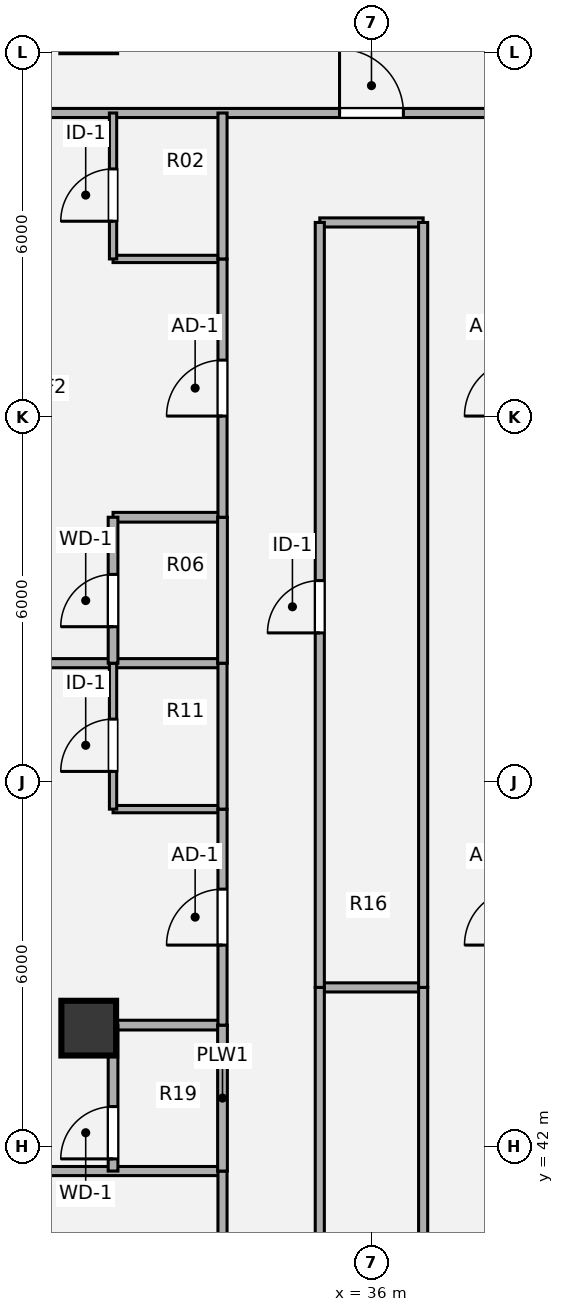
"""IFC4 building model, lengths in metres.
Left out: names, types, materials, properties, quantities, classifications, styles, units other than length and angle.
Written with IfcOpenShell. Run it as: python <this file> out.ifc"""

import sys

from ifc_helpers import new_model, si_unit, direction, frame, frame_2d, origin, origin_2d, place, context, subcontext, project, spatial, rectangle, hollow_circle, extrude, source, transform, mapped, element, fill, save


model = new_model("IFC4")
c1 = context("Model", 3, precision=1e-05, world=origin(), true_north=direction((0.0, 1.0)))
c2 = subcontext(c1, "Body", "Model", "MODEL_VIEW")
j1 = project(units=[si_unit("LENGTHUNIT", "METRE"), si_unit("PLANEANGLEUNIT", "RADIAN")], contexts=[c1])
p1 = place(None, origin())
s1 = spatial("IfcSite", under=j1, at=p1, CompositionType="ELEMENT")
p2 = place(p1, origin())
s2 = spatial("IfcBuilding", under=s1, at=p2, CompositionType="ELEMENT")
p3 = place(p2, frame((0.0, 0.0, 226.8)))
s3 = spatial("IfcBuildingStorey", under=s2, at=p3, CompositionType="ELEMENT", Elevation=226.8)
m1 = source(origin(), c2, "Body", "SweptSolid", [
    extrude(hollow_circle(Radius=0.45, WallThickness=0.032, at=origin_2d()), origin(), (0.0, 0.0, 1.0), 3.78),
])
p4 = place(p3, frame((31.35, 43.95, 0.0), z_axis=(0.0, 0.0, 1.0), x_axis=(1.0, 0.0, 0.0)))
e1 = element("IfcColumn", 1, at=p4, inside=s3, PredefinedType="COLUMN", context=c2, shape_type="MappedRepresentation", body=[
    mapped(m1, transform((0.0, 0.0, 0.0), x_axis=(1.0, 0.0, 0.0), y_axis=(0.0, 1.0, 0.0), z_axis=(0.0, 0.0, 1.0), scale=1.0)),
])
p5 = place(p3, frame((27.558, 41.6, 0.0), z_axis=(0.0, 0.0, 1.0), x_axis=(1.0, 0.0, 0.0)))
e2 = element("IfcWall", 2, at=p5, inside=s3, PredefinedType="PARTITIONING", context=c2, shape_type="SweptSolid", body=[
    extrude(rectangle(XDim=5.992, YDim=0.15, at=frame_2d((2.996, 0.0))), origin(), (0.0, 0.0, 1.0), 3.5),
])
p6 = place(p3, frame((31.75, 44.0, 0.0), z_axis=(0.0, 0.0, 1.0), x_axis=(1.0, 0.0, 0.0)))
e3 = element("IfcWall", 3, at=p6, inside=s3, PredefinedType="PLUMBINGWALL", context=c2, shape_type="SweptSolid", body=[
    extrude(rectangle(XDim=1.8, YDim=0.16, at=frame_2d((0.9, 0.0))), origin(), (0.0, 0.0, 1.0), 2.903),
])
p7 = place(p3, frame((35.15, 44.62, 0.0), z_axis=(0.0, 0.0, 1.0), x_axis=(1.0, 0.0, 0.0)))
e4 = element("IfcWall", 4, at=p7, inside=s3, PredefinedType="PARTITIONING", context=c2, shape_type="SweptSolid", body=[
    extrude(rectangle(XDim=1.7, YDim=0.15, at=frame_2d((0.85, 0.0))), origin(), (0.0, 0.0, 1.0), 3.259),
])
p8 = place(p3, frame((31.75, 47.552, 0.0), z_axis=(0.0, 0.0, 1.0), x_axis=(1.0, 0.0, 0.0)))
e5 = element("IfcWall", 5, at=p8, inside=s3, PredefinedType="PARTITIONING", context=c2, shape_type="SweptSolid", body=[
    extrude(rectangle(XDim=1.8, YDim=0.12, at=frame_2d((0.9, 0.0))), origin(), (0.0, 0.0, 1.0), 3.259),
])
p9 = place(p3, frame((17.78, 49.952, 0.0), z_axis=(0.0, 0.0, 1.0), x_axis=(1.0, 0.0, 0.0)))
e6 = element("IfcWall", 6, at=p9, inside=s3, PredefinedType="PARTITIONING", context=c2, shape_type="SweptSolid", body=[
    extrude(rectangle(XDim=15.77, YDim=0.15, at=frame_2d((7.885, 0.0))), origin(), (0.0, 0.0, 1.0), 2.982),
])
p10 = place(p3, frame((31.75, 52.352, 0.0), z_axis=(0.0, 0.0, 1.0), x_axis=(1.0, 0.0, 0.0)))
e7 = element("IfcWall", 7, at=p10, inside=s3, PredefinedType="PLUMBINGWALL", context=c2, shape_type="SweptSolid", body=[
    extrude(rectangle(XDim=1.8, YDim=0.16, at=frame_2d((0.9, 0.0))), origin(), (0.0, 0.0, 1.0), 3.259),
])
p11 = place(p3, frame((31.75, 56.6, 0.0), z_axis=(0.0, 0.0, 1.0), x_axis=(1.0, 0.0, 0.0)))
e8 = element("IfcWall", 8, at=p11, inside=s3, PredefinedType="PARTITIONING", context=c2, shape_type="SweptSolid", body=[
    extrude(rectangle(XDim=1.8, YDim=0.12, at=frame_2d((0.9, 0.0))), origin(), (0.0, 0.0, 1.0), 3.259),
])
p12 = place(p3, frame((35.15, 57.2, 0.0), z_axis=(0.0, 0.0, 1.0), x_axis=(1.0, 0.0, 0.0)))
e9 = element("IfcWall", 9, at=p12, inside=s3, PredefinedType="PARTITIONING", context=c2, shape_type="SweptSolid", body=[
    extrude(rectangle(XDim=1.7, YDim=0.15, at=frame_2d((0.85, 0.0))), origin(), (0.0, 0.0, 1.0), 3.308),
])
p13 = place(p3, frame((27.1, 59.0, 0.0), z_axis=(0.0, 0.0, 1.0), x_axis=(1.0, 0.0, 0.0)))
e10 = element("IfcWall", 10, at=p13, inside=s3, PredefinedType="PARTITIONING", context=c2, shape_type="SweptSolid", body=[
    extrude(rectangle(XDim=17.8, YDim=0.15, at=frame_2d((8.9, 0.0))), origin(), (0.0, 0.0, 1.0), 3.308),
])
p14 = place(p13, frame((8.375, 0.0, 0.0)))
e11 = element("IfcOpeningElement", 11, at=p14, cuts=e10, PredefinedType="OPENING", context=c2, shape_type="SweptSolid", body=[
    extrude(rectangle(XDim=1.05, YDim=2.1, at=origin_2d()), frame((0.525, 0.085, 1.05), z_axis=(0.0, -1.0, 0.0), x_axis=(1.0, 0.0, 0.0)), (0.0, 0.0, 1.0), 0.17),
])
p15 = place(p3, frame((31.75, 41.6, 0.0), z_axis=(0.0, 0.0, 1.0), x_axis=(0.0, 1.0, 0.0)))
e12 = element("IfcWall", 12, at=p15, inside=s3, PredefinedType="PLUMBINGWALL", context=c2, shape_type="SweptSolid", body=[
    extrude(rectangle(XDim=2.4, YDim=0.16, at=frame_2d((1.2, 0.0))), origin(), (0.0, 0.0, 1.0), 3.5),
])
p16 = place(p15, frame((0.2, 0.0, 0.0)))
e13 = element("IfcOpeningElement", 13, at=p16, cuts=e12, PredefinedType="OPENING", context=c2, shape_type="SweptSolid", body=[
    extrude(rectangle(XDim=0.86, YDim=2.1, at=origin_2d()), frame((0.43, 0.09, 1.05), z_axis=(0.0, -1.0, 0.0), x_axis=(1.0, 0.0, 0.0)), (0.0, 0.0, 1.0), 0.18),
])
p17 = place(p3, frame((31.75, 47.552, 0.0), z_axis=(0.0, 0.0, 1.0), x_axis=(0.0, 1.0, 0.0)))
e14 = element("IfcWall", 14, at=p17, inside=s3, PredefinedType="PARTITIONING", context=c2, shape_type="SweptSolid", body=[
    extrude(rectangle(XDim=2.4, YDim=0.12, at=frame_2d((1.2, 0.0))), origin(), (0.0, 0.0, 1.0), 3.5),
])
p18 = place(p17, frame((0.62, 0.0, 0.0)))
e15 = element("IfcOpeningElement", 15, at=p18, cuts=e14, PredefinedType="OPENING", context=c2, shape_type="SweptSolid", body=[
    extrude(rectangle(XDim=0.86, YDim=2.1, at=origin_2d()), frame((0.43, 0.07, 1.05), z_axis=(0.0, -1.0, 0.0), x_axis=(1.0, 0.0, 0.0)), (0.0, 0.0, 1.0), 0.14),
])
p19 = place(p3, frame((31.75, 49.952, 0.0), z_axis=(0.0, 0.0, 1.0), x_axis=(0.0, 1.0, 0.0)))
e16 = element("IfcWall", 16, at=p19, inside=s3, PredefinedType="PLUMBINGWALL", context=c2, shape_type="SweptSolid", body=[
    extrude(rectangle(XDim=2.4, YDim=0.16, at=frame_2d((1.2, 0.0))), origin(), (0.0, 0.0, 1.0), 3.5),
])
p20 = place(p19, frame((0.6, 0.0, 0.0)))
e17 = element("IfcOpeningElement", 17, at=p20, cuts=e16, PredefinedType="OPENING", context=c2, shape_type="SweptSolid", body=[
    extrude(rectangle(XDim=0.86, YDim=2.1, at=origin_2d()), frame((0.43, 0.09, 1.05), z_axis=(0.0, -1.0, 0.0), x_axis=(1.0, 0.0, 0.0)), (0.0, 0.0, 1.0), 0.18),
])
p21 = place(p3, frame((31.75, 56.6, 0.0), z_axis=(0.0, 0.0, 1.0), x_axis=(0.0, 1.0, 0.0)))
e18 = element("IfcWall", 18, at=p21, inside=s3, PredefinedType="PARTITIONING", context=c2, shape_type="SweptSolid", body=[
    extrude(rectangle(XDim=2.4, YDim=0.12, at=frame_2d((1.2, 0.0))), origin(), (0.0, 0.0, 1.0), 3.5),
])
p22 = place(p21, frame((0.62, 0.0, 0.0)))
e19 = element("IfcOpeningElement", 19, at=p22, cuts=e18, PredefinedType="OPENING", context=c2, shape_type="SweptSolid", body=[
    extrude(rectangle(XDim=0.86, YDim=2.1, at=origin_2d()), frame((0.43, 0.07, 1.05), z_axis=(0.0, -1.0, 0.0), x_axis=(1.0, 0.0, 0.0)), (0.0, 0.0, 1.0), 0.14),
])
p23 = place(p3, frame((33.55, 21.2, 0.0), z_axis=(0.0, 0.0, 1.0), x_axis=(0.0, 1.0, 0.0)))
e20 = element("IfcWall", 20, at=p23, inside=s3, PredefinedType="PARTITIONING", context=c2, shape_type="SweptSolid", body=[
    extrude(rectangle(XDim=20.4, YDim=0.15, at=frame_2d((10.2, 0.0))), origin(), (0.0, 0.0, 1.0), 3.5),
])
p24 = place(p23, frame((9.64, 0.0, 0.0)))
e21 = element("IfcOpeningElement", 21, at=p24, cuts=e20, PredefinedType="OPENING", context=c2, shape_type="SweptSolid", body=[
    extrude(rectangle(XDim=0.86, YDim=2.1, at=origin_2d()), frame((0.43, 0.085, 1.05), z_axis=(0.0, -1.0, 0.0), x_axis=(1.0, 0.0, 0.0)), (0.0, 0.0, 1.0), 0.17),
])
p25 = place(p3, frame((33.55, 41.6, 0.0), z_axis=(0.0, 0.0, 1.0), x_axis=(0.0, 1.0, 0.0)))
e22 = element("IfcWall", 22, at=p25, inside=s3, PredefinedType="PLUMBINGWALL", context=c2, shape_type="SweptSolid", body=[
    extrude(rectangle(XDim=2.4, YDim=0.16, at=frame_2d((1.2, 0.0))), origin(), (0.0, 0.0, 1.0), 3.5),
])
p26 = place(p3, frame((33.55, 44.0, 0.0), z_axis=(0.0, 0.0, 1.0), x_axis=(0.0, 1.0, 0.0)))
e23 = element("IfcWall", 23, at=p26, inside=s3, PredefinedType="PARTITIONING", context=c2, shape_type="SweptSolid", body=[
    extrude(rectangle(XDim=3.552, YDim=0.15, at=frame_2d((1.776, 0.0))), origin(), (0.0, 0.0, 1.0), 3.5),
])
p27 = place(p26, frame((1.316, 0.0, 0.0)))
e24 = element("IfcOpeningElement", 24, at=p27, cuts=e23, PredefinedType="OPENING", context=c2, shape_type="SweptSolid", body=[
    extrude(rectangle(XDim=0.92, YDim=2.1, at=origin_2d()), frame((0.46, 0.085, 1.05), z_axis=(0.0, -1.0, 0.0), x_axis=(1.0, 0.0, 0.0)), (0.0, 0.0, 1.0), 0.17),
])
p28 = place(p3, frame((33.55, 47.552, 0.0), z_axis=(0.0, 0.0, 1.0), x_axis=(0.0, 1.0, 0.0)))
e25 = element("IfcWall", 25, at=p28, inside=s3, PredefinedType="PARTITIONING", context=c2, shape_type="SweptSolid", body=[
    extrude(rectangle(XDim=2.4, YDim=0.15, at=frame_2d((1.2, 0.0))), origin(), (0.0, 0.0, 1.0), 3.5),
])
p29 = place(p3, frame((33.55, 49.952, 0.0), z_axis=(0.0, 0.0, 1.0), x_axis=(0.0, 1.0, 0.0)))
e26 = element("IfcWall", 26, at=p29, inside=s3, PredefinedType="PLUMBINGWALL", context=c2, shape_type="SweptSolid", body=[
    extrude(rectangle(XDim=2.4, YDim=0.16, at=frame_2d((1.2, 0.0))), origin(), (0.0, 0.0, 1.0), 3.5),
])
p30 = place(p3, frame((33.55, 52.352, 0.0), z_axis=(0.0, 0.0, 1.0), x_axis=(0.0, 1.0, 0.0)))
e27 = element("IfcWall", 27, at=p30, inside=s3, PredefinedType="PARTITIONING", context=c2, shape_type="SweptSolid", body=[
    extrude(rectangle(XDim=4.248, YDim=0.15, at=frame_2d((2.124, 0.0))), origin(), (0.0, 0.0, 1.0), 3.5),
])
p31 = place(p30, frame((1.664, 0.0, 0.0)))
e28 = element("IfcOpeningElement", 28, at=p31, cuts=e27, PredefinedType="OPENING", context=c2, shape_type="SweptSolid", body=[
    extrude(rectangle(XDim=0.92, YDim=2.1, at=origin_2d()), frame((0.46, 0.085, 1.05), z_axis=(0.0, -1.0, 0.0), x_axis=(1.0, 0.0, 0.0)), (0.0, 0.0, 1.0), 0.17),
])
p32 = place(p3, frame((33.55, 56.6, 0.0), z_axis=(0.0, 0.0, 1.0), x_axis=(0.0, 1.0, 0.0)))
e29 = element("IfcWall", 29, at=p32, inside=s3, PredefinedType="PARTITIONING", context=c2, shape_type="SweptSolid", body=[
    extrude(rectangle(XDim=2.4, YDim=0.15, at=frame_2d((1.2, 0.0))), origin(), (0.0, 0.0, 1.0), 3.5),
])
p33 = place(p3, frame((35.15, 25.2, 0.0), z_axis=(0.0, 0.0, 1.0), x_axis=(0.0, 1.0, 0.0)))
e30 = element("IfcWall", 30, at=p33, inside=s3, PredefinedType="PARTITIONING", context=c2, shape_type="SweptSolid", body=[
    extrude(rectangle(XDim=19.42, YDim=0.15, at=frame_2d((9.71, 0.0))), origin(), (0.0, 0.0, 1.0), 3.5),
])
p34 = place(p3, frame((35.15, 44.62, 0.0), z_axis=(0.0, 0.0, 1.0), x_axis=(0.0, 1.0, 0.0)))
e31 = element("IfcWall", 31, at=p34, inside=s3, PredefinedType="PARTITIONING", context=c2, shape_type="SweptSolid", body=[
    extrude(rectangle(XDim=12.58, YDim=0.15, at=frame_2d((6.29, 0.0))), origin(), (0.0, 0.0, 1.0), 3.5),
])
p35 = place(p34, frame((5.83, 0.0, 0.0)))
e32 = element("IfcOpeningElement", 32, at=p35, cuts=e31, PredefinedType="OPENING", context=c2, shape_type="SweptSolid", body=[
    extrude(rectangle(XDim=0.86, YDim=2.1, at=origin_2d()), frame((0.43, 0.085, 1.05), z_axis=(0.0, -1.0, 0.0), x_axis=(1.0, 0.0, 0.0)), (0.0, 0.0, 1.0), 0.17),
])
p36 = place(p3, frame((36.85, 25.2, 0.0), z_axis=(0.0, 0.0, 1.0), x_axis=(0.0, 1.0, 0.0)))
e33 = element("IfcWall", 33, at=p36, inside=s3, PredefinedType="PARTITIONING", context=c2, shape_type="SweptSolid", body=[
    extrude(rectangle(XDim=19.42, YDim=0.15, at=frame_2d((9.71, 0.0))), origin(), (0.0, 0.0, 1.0), 3.5),
])
p37 = place(p36, frame((9.185, 0.0, 0.0)))
e34 = element("IfcOpeningElement", 34, at=p37, cuts=e33, PredefinedType="OPENING", context=c2, shape_type="SweptSolid", body=[
    extrude(rectangle(XDim=1.05, YDim=2.1, at=origin_2d()), frame((0.525, 0.085, 1.05), z_axis=(0.0, -1.0, 0.0), x_axis=(1.0, 0.0, 0.0)), (0.0, 0.0, 1.0), 0.17),
])
p38 = place(p3, frame((36.85, 44.62, 0.0), z_axis=(0.0, 0.0, 1.0), x_axis=(0.0, 1.0, 0.0)))
e35 = element("IfcWall", 35, at=p38, inside=s3, PredefinedType="PARTITIONING", context=c2, shape_type="SweptSolid", body=[
    extrude(rectangle(XDim=12.58, YDim=0.15, at=frame_2d((6.29, 0.0))), origin(), (0.0, 0.0, 1.0), 3.5),
])
m2 = source(origin(), c2, "Body", "SweptSolid", [
    extrude(rectangle(XDim=1.05, YDim=2.1, at=origin_2d()), frame((0.525, 0.025, 1.05), z_axis=(0.0, -1.0, 0.0), x_axis=(1.0, 0.0, 0.0)), (0.0, 0.0, 1.0), 0.05),
])
p39 = place(p14, origin())
e36 = element("IfcDoor", 36, at=p39, inside=s3, OperationType="SINGLE_SWING_LEFT", PredefinedType="DOOR", context=c2, shape_type="MappedRepresentation", body=[
    mapped(m2, transform((0.0, 0.0, 0.0), x_axis=(1.0, 0.0, 0.0), y_axis=(0.0, 1.0, 0.0), z_axis=(0.0, 0.0, 1.0), scale=1.0)),
])
fill(e11, e36)
m3 = source(origin(), c2, "Body", "SweptSolid", [
    extrude(rectangle(XDim=0.86, YDim=2.1, at=origin_2d()), frame((0.43, 0.025, 1.05), z_axis=(0.0, -1.0, 0.0), x_axis=(1.0, 0.0, 0.0)), (0.0, 0.0, 1.0), 0.05),
])
p40 = place(p16, origin())
e37 = element("IfcDoor", 37, at=p40, inside=s3, OperationType="SINGLE_SWING_LEFT", PredefinedType="DOOR", context=c2, shape_type="MappedRepresentation", body=[
    mapped(m3, transform((0.0, 0.0, 0.0), x_axis=(1.0, 0.0, 0.0), y_axis=(0.0, 1.0, 0.0), z_axis=(0.0, 0.0, 1.0), scale=1.0)),
])
fill(e13, e37)
m4 = source(origin(), c2, "Body", "SweptSolid", [
    extrude(rectangle(XDim=0.86, YDim=2.1, at=origin_2d()), frame((0.43, 0.025, 1.05), z_axis=(0.0, -1.0, 0.0), x_axis=(1.0, 0.0, 0.0)), (0.0, 0.0, 1.0), 0.05),
])
p41 = place(p18, origin())
e38 = element("IfcDoor", 38, at=p41, inside=s3, OperationType="SINGLE_SWING_LEFT", PredefinedType="DOOR", context=c2, shape_type="MappedRepresentation", body=[
    mapped(m4, transform((0.0, 0.0, 0.0), x_axis=(1.0, 0.0, 0.0), y_axis=(0.0, 1.0, 0.0), z_axis=(0.0, 0.0, 1.0), scale=1.0)),
])
fill(e15, e38)
p42 = place(p20, origin())
e39 = element("IfcDoor", 39, at=p42, inside=s3, OperationType="SINGLE_SWING_LEFT", PredefinedType="DOOR", context=c2, shape_type="MappedRepresentation", body=[
    mapped(m3, transform((0.0, 0.0, 0.0), x_axis=(1.0, 0.0, 0.0), y_axis=(0.0, 1.0, 0.0), z_axis=(0.0, 0.0, 1.0), scale=1.0)),
])
fill(e17, e39)
p43 = place(p22, origin())
e40 = element("IfcDoor", 40, at=p43, inside=s3, OperationType="SINGLE_SWING_LEFT", PredefinedType="DOOR", context=c2, shape_type="MappedRepresentation", body=[
    mapped(m4, transform((0.0, 0.0, 0.0), x_axis=(1.0, 0.0, 0.0), y_axis=(0.0, 1.0, 0.0), z_axis=(0.0, 0.0, 1.0), scale=1.0)),
])
fill(e19, e40)
m5 = source(origin(), c2, "Body", "SweptSolid", [
    extrude(rectangle(XDim=0.92, YDim=2.1, at=origin_2d()), frame((0.46, 0.025, 1.05), z_axis=(0.0, -1.0, 0.0), x_axis=(1.0, 0.0, 0.0)), (0.0, 0.0, 1.0), 0.05),
])
p44 = place(p27, origin())
e41 = element("IfcDoor", 41, at=p44, inside=s3, OperationType="SINGLE_SWING_LEFT", PredefinedType="DOOR", context=c2, shape_type="MappedRepresentation", body=[
    mapped(m5, transform((0.0, 0.0, 0.0), x_axis=(1.0, 0.0, 0.0), y_axis=(0.0, 1.0, 0.0), z_axis=(0.0, 0.0, 1.0), scale=1.0)),
])
fill(e24, e41)
p45 = place(p31, origin())
e42 = element("IfcDoor", 42, at=p45, inside=s3, OperationType="SINGLE_SWING_LEFT", PredefinedType="DOOR", context=c2, shape_type="MappedRepresentation", body=[
    mapped(m5, transform((0.0, 0.0, 0.0), x_axis=(1.0, 0.0, 0.0), y_axis=(0.0, 1.0, 0.0), z_axis=(0.0, 0.0, 1.0), scale=1.0)),
])
fill(e28, e42)
p46 = place(p35, origin())
e43 = element("IfcDoor", 43, at=p46, inside=s3, OperationType="SINGLE_SWING_LEFT", PredefinedType="DOOR", context=c2, shape_type="MappedRepresentation", body=[
    mapped(m4, transform((0.0, 0.0, 0.0), x_axis=(1.0, 0.0, 0.0), y_axis=(0.0, 1.0, 0.0), z_axis=(0.0, 0.0, 1.0), scale=1.0)),
])
fill(e32, e43)
save(model, sys.argv[1])
